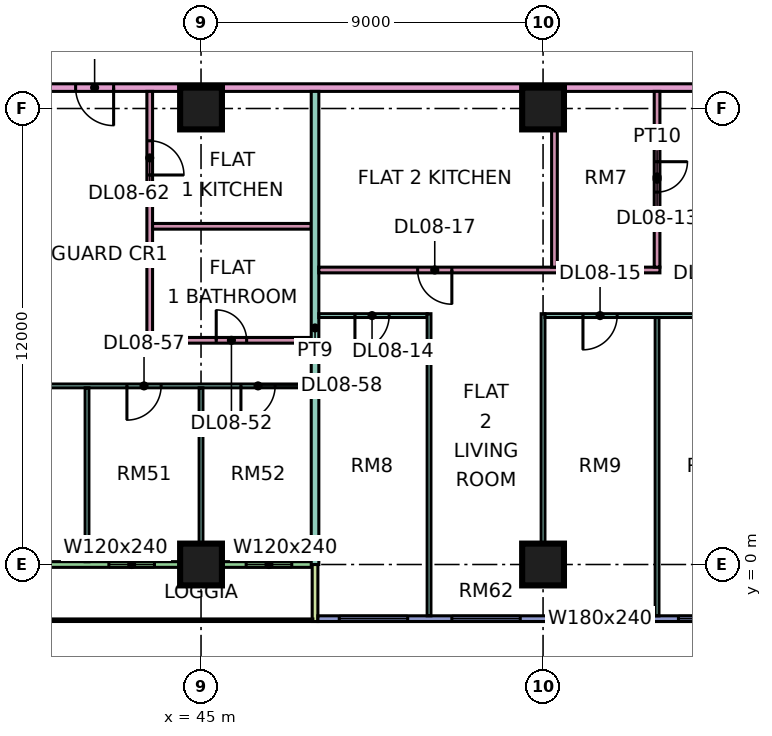
"""IFC4 building model, lengths in metres.
Left out: names, types, materials, properties, quantities, classifications, styles, units other than length and angle.
Written with IfcOpenShell. Run it as: python <this file> out.ifc"""

import sys

from ifc_helpers import new_model, si_unit, direction, frame, frame_2d, origin, origin_2d, place, context, subcontext, project, spatial, rectangle, extrude, element, fill, save


model = new_model("IFC4")
c1 = context("Model", 3, precision=1e-05, world=origin(), true_north=direction((0.0, 1.0)))
c2 = subcontext(c1, "Body", "Model", "MODEL_VIEW")
j1 = project(units=[si_unit("LENGTHUNIT", "METRE"), si_unit("PLANEANGLEUNIT", "RADIAN")], contexts=[c1])
p1 = place(None, origin())
s1 = spatial("IfcSite", under=j1, at=p1, CompositionType="ELEMENT")
p2 = place(p1, origin())
s2 = spatial("IfcBuilding", under=s1, at=p2, CompositionType="ELEMENT")
p3 = place(p2, frame((0.0, 0.0, 45.15)))
s3 = spatial("IfcBuildingStorey", under=s2, at=p3, CompositionType="ELEMENT", Elevation=45.15)
for number, where, z_axis, x_axis in (
    (1, (45.0, 0.0, 0.0), (0.0, 0.0, 1.0), (1.0, 0.0, 0.0)),
    (2, (45.0, 12.0, 0.0), (0.0, 0.0, 1.0), (1.0, 0.0, 0.0)),
    (3, (54.0, 0.0, 0.0), (0.0, 0.0, 1.0), (1.0, 0.0, 0.0)),
    (4, (54.0, 12.0, 0.0), (0.0, 0.0, 1.0), (1.0, 0.0, 0.0)),
):
    element("IfcColumn", number, at=place(p3, frame(where, z_axis=z_axis, x_axis=x_axis)), inside=s3, PredefinedType="COLUMN", context=c2, shape_type="SweptSolid", body=[
        extrude(rectangle(XDim=1.1, YDim=1.1, at=origin_2d()), origin(), (0.0, 0.0, 1.0), 3.75),
    ])
p4 = place(p3, frame((36.075, 0.0, 0.0), z_axis=(0.0, 0.0, 1.0), x_axis=(1.0, 0.0, 0.0)))
e5 = element("IfcWall", 5, at=p4, inside=s3, PredefinedType="SOLIDWALL", context=c2, shape_type="SweptSolid", body=[
    extrude(rectangle(XDim=11.85, YDim=0.15, at=frame_2d((5.925, 0.0))), origin(), (0.0, 0.0, 1.0), 3.35),
])
p5 = place(p4, frame((2.35, 0.0, 0.0)))
e6 = element("IfcOpeningElement", 6, at=p5, cuts=e5, PredefinedType="OPENING", context=c2, shape_type="SweptSolid", body=[
    extrude(rectangle(XDim=1.8, YDim=2.4, at=frame_2d((0.9, 1.2))), frame((0.0, 0.085, 0.0), z_axis=(0.0, -1.0, 0.0), x_axis=(1.0, 0.0, 0.0)), (0.0, 0.0, 1.0), 0.17),
])
p6 = place(p4, frame((6.5, 0.0, 0.45)))
e7 = element("IfcOpeningElement", 7, at=p6, cuts=e5, PredefinedType="OPENING", context=c2, shape_type="SweptSolid", body=[
    extrude(rectangle(XDim=1.2, YDim=2.4, at=frame_2d((0.6, 1.2))), frame((0.0, 0.085, 0.0), z_axis=(0.0, -1.0, 0.0), x_axis=(1.0, 0.0, 0.0)), (0.0, 0.0, 1.0), 0.17),
])
p7 = place(p4, frame((10.113, 0.0, 0.45)))
e8 = element("IfcOpeningElement", 8, at=p7, cuts=e5, PredefinedType="OPENING", context=c2, shape_type="SweptSolid", body=[
    extrude(rectangle(XDim=1.2, YDim=2.4, at=frame_2d((0.6, 1.2))), frame((0.0, 0.085, 0.0), z_axis=(0.0, -1.0, 0.0), x_axis=(1.0, 0.0, 0.0)), (0.0, 0.0, 1.0), 0.17),
])
p8 = place(p3, frame((48.0, -1.5, 0.0), z_axis=(0.0, 0.0, 1.0), x_axis=(0.0, 1.0, 0.0)))
e9 = element("IfcWall", 9, at=p8, inside=s3, PredefinedType="SOLIDWALL", context=c2, shape_type="SweptSolid", body=[
    extrude(rectangle(XDim=1.5, YDim=0.15, at=frame_2d((0.75, 0.0))), origin(), (0.0, 0.0, 1.0), 3.35),
])
p9 = place(p3, frame((48.075, -1.425, 0.0), z_axis=(0.0, 0.0, 1.0), x_axis=(1.0, 0.0, 0.0)))
e10 = element("IfcWall", 10, at=p9, inside=s3, PredefinedType="SOLIDWALL", context=c2, shape_type="SweptSolid", body=[
    extrude(rectangle(XDim=11.85, YDim=0.15, at=frame_2d((5.925, 0.0))), origin(), (0.0, 0.0, 1.0), 3.35),
])
p10 = place(p9, frame((0.562, 0.0, 0.45)))
e11 = element("IfcOpeningElement", 11, at=p10, cuts=e10, PredefinedType="OPENING", context=c2, shape_type="SweptSolid", body=[
    extrude(rectangle(XDim=1.8, YDim=2.4, at=frame_2d((0.9, 1.2))), frame((0.0, 0.085, 0.0), z_axis=(0.0, -1.0, 0.0), x_axis=(1.0, 0.0, 0.0)), (0.0, 0.0, 1.0), 0.17),
])
p11 = place(p9, frame((3.525, 0.0, 0.45)))
e12 = element("IfcOpeningElement", 12, at=p11, cuts=e10, PredefinedType="OPENING", context=c2, shape_type="SweptSolid", body=[
    extrude(rectangle(XDim=1.8, YDim=2.4, at=frame_2d((0.9, 1.2))), frame((0.0, 0.085, 0.0), z_axis=(0.0, -1.0, 0.0), x_axis=(1.0, 0.0, 0.0)), (0.0, 0.0, 1.0), 0.17),
])
p12 = place(p9, frame((6.525, 0.0, 0.45)))
e13 = element("IfcOpeningElement", 13, at=p12, cuts=e10, PredefinedType="OPENING", context=c2, shape_type="SweptSolid", body=[
    extrude(rectangle(XDim=1.8, YDim=2.4, at=frame_2d((0.9, 1.2))), frame((0.0, 0.085, 0.0), z_axis=(0.0, -1.0, 0.0), x_axis=(1.0, 0.0, 0.0)), (0.0, 0.0, 1.0), 0.17),
])
p13 = place(p9, frame((9.488, 0.0, 0.45)))
e14 = element("IfcOpeningElement", 14, at=p13, cuts=e10, PredefinedType="OPENING", context=c2, shape_type="SweptSolid", body=[
    extrude(rectangle(XDim=1.8, YDim=2.4, at=frame_2d((0.9, 1.2))), frame((0.0, 0.085, 0.0), z_axis=(0.0, -1.0, 0.0), x_axis=(1.0, 0.0, 0.0)), (0.0, 0.0, 1.0), 0.17),
])
p14 = place(p3, frame((33.05, 4.7, 0.0), z_axis=(0.0, 0.0, 1.0), x_axis=(1.0, 0.0, 0.0)))
e15 = element("IfcWall", 15, at=p14, inside=s3, PredefinedType="PARTITIONING", context=c2, shape_type="SweptSolid", body=[
    extrude(rectangle(XDim=14.85, YDim=0.1, at=frame_2d((7.425, 0.0))), origin(), (0.0, 0.0, 1.0), 3.35),
])
p15 = place(p14, frame((10.0, 0.0, 0.0)))
e16 = element("IfcOpeningElement", 16, at=p15, cuts=e15, PredefinedType="OPENING", context=c2, shape_type="SweptSolid", body=[
    extrude(rectangle(XDim=0.9, YDim=2.1, at=frame_2d((0.45, 1.05))), frame((0.0, 0.06, 0.0), z_axis=(0.0, -1.0, 0.0), x_axis=(1.0, 0.0, 0.0)), (0.0, 0.0, 1.0), 0.12),
])
p16 = place(p14, frame((13.0, 0.0, 0.0)))
e17 = element("IfcOpeningElement", 17, at=p16, cuts=e15, PredefinedType="OPENING", context=c2, shape_type="SweptSolid", body=[
    extrude(rectangle(XDim=0.9, YDim=2.1, at=frame_2d((0.45, 1.05))), frame((0.0, 0.06, 0.0), z_axis=(0.0, -1.0, 0.0), x_axis=(1.0, 0.0, 0.0)), (0.0, 0.0, 1.0), 0.12),
])
p17 = place(p14, frame((4.0, 0.0, 0.0)))
e18 = element("IfcOpeningElement", 18, at=p17, cuts=e15, PredefinedType="OPENING", context=c2, shape_type="SweptSolid", body=[
    extrude(rectangle(XDim=0.9, YDim=2.1, at=frame_2d((0.45, 1.05))), frame((0.0, 0.06, 0.0), z_axis=(0.0, -1.0, 0.0), x_axis=(1.0, 0.0, 0.0)), (0.0, 0.0, 1.0), 0.12),
])
p18 = place(p3, frame((40.65, 12.55, 0.0), z_axis=(0.0, 0.0, 1.0), x_axis=(1.0, 0.0, 0.0)))
e19 = element("IfcWall", 19, at=p18, inside=s3, PredefinedType="PARTITIONING", context=c2, shape_type="SweptSolid", body=[
    extrude(rectangle(XDim=31.276, YDim=0.2, at=frame_2d((15.638, 0.0))), origin(), (0.0, 0.0, 1.0), 3.35),
])
p19 = place(p18, frame((17.4, 0.0, 0.0)))
e20 = element("IfcOpeningElement", 20, at=p19, cuts=e19, PredefinedType="OPENING", context=c2, shape_type="SweptSolid", body=[
    extrude(rectangle(XDim=1.0, YDim=2.1, at=frame_2d((0.5, 1.05))), frame((0.0, 0.11, 0.0), z_axis=(0.0, -1.0, 0.0), x_axis=(1.0, 0.0, 0.0)), (0.0, 0.0, 1.0), 0.22),
])
p20 = place(p18, frame((26.25, 0.0, 0.0)))
e21 = element("IfcOpeningElement", 21, at=p20, cuts=e19, PredefinedType="OPENING", context=c2, shape_type="SweptSolid", body=[
    extrude(rectangle(XDim=1.0, YDim=2.1, at=frame_2d((0.5, 1.05))), frame((0.0, 0.11, 0.0), z_axis=(0.0, -1.0, 0.0), x_axis=(1.0, 0.0, 0.0)), (0.0, 0.0, 1.0), 0.22),
])
p21 = place(p18, frame((1.05, 0.0, 0.0)))
e22 = element("IfcOpeningElement", 22, at=p21, cuts=e19, PredefinedType="OPENING", context=c2, shape_type="SweptSolid", body=[
    extrude(rectangle(XDim=1.0, YDim=2.1, at=frame_2d((0.5, 1.05))), frame((0.0, 0.11, 0.0), z_axis=(0.0, -1.0, 0.0), x_axis=(1.0, 0.0, 0.0)), (0.0, 0.0, 1.0), 0.22),
])
p22 = place(p3, frame((42.0, 0.074, 0.0), z_axis=(0.0, 0.0, 1.0), x_axis=(0.0, 1.0, 0.0)))
e23 = element("IfcWall", 23, at=p22, inside=s3, PredefinedType="PARTITIONING", context=c2, shape_type="SweptSolid", body=[
    extrude(rectangle(XDim=4.576, YDim=0.1, at=frame_2d((2.288, 0.0))), origin(), (0.0, 0.0, 1.0), 3.35),
])
p23 = place(p3, frame((43.65, 5.825, 0.0), z_axis=(0.0, 0.0, 1.0), x_axis=(0.0, 1.0, 0.0)))
e24 = element("IfcWall", 24, at=p23, inside=s3, PredefinedType="PARTITIONING", context=c2, shape_type="SweptSolid", body=[
    extrude(rectangle(XDim=6.625, YDim=0.15, at=frame_2d((3.312, 0.0))), origin(), (0.0, 0.0, 1.0), 3.35),
])
p24 = place(p23, frame((4.425, 0.0, 0.0)))
e25 = element("IfcOpeningElement", 25, at=p24, cuts=e24, PredefinedType="OPENING", context=c2, shape_type="SweptSolid", body=[
    extrude(rectangle(XDim=0.9, YDim=2.1, at=frame_2d((0.45, 1.05))), frame((0.0, 0.085, 0.0), z_axis=(0.0, -1.0, 0.0), x_axis=(1.0, 0.0, 0.0)), (0.0, 0.0, 1.0), 0.17),
])
p25 = place(p3, frame((43.725, 5.9, 0.0), z_axis=(0.0, 0.0, 1.0), x_axis=(1.0, 0.0, 0.0)))
e26 = element("IfcWall", 26, at=p25, inside=s3, PredefinedType="PARTITIONING", context=c2, shape_type="SweptSolid", body=[
    extrude(rectangle(XDim=4.175, YDim=0.15, at=frame_2d((2.087, 0.0))), origin(), (0.0, 0.0, 1.0), 3.35),
])
p26 = place(p25, frame((1.675, 0.0, 0.0)))
e27 = element("IfcOpeningElement", 27, at=p26, cuts=e26, PredefinedType="OPENING", context=c2, shape_type="SweptSolid", body=[
    extrude(rectangle(XDim=0.8, YDim=2.1, at=frame_2d((0.4, 1.05))), frame((0.0, 0.085, 0.0), z_axis=(0.0, -1.0, 0.0), x_axis=(1.0, 0.0, 0.0)), (0.0, 0.0, 1.0), 0.17),
])
p27 = place(p3, frame((43.725, 8.9, 0.0), z_axis=(0.0, 0.0, 1.0), x_axis=(1.0, 0.0, 0.0)))
e28 = element("IfcWall", 28, at=p27, inside=s3, PredefinedType="PARTITIONING", context=c2, shape_type="SweptSolid", body=[
    extrude(rectangle(XDim=4.175, YDim=0.15, at=frame_2d((2.087, 0.0))), origin(), (0.0, 0.0, 1.0), 3.35),
])
p28 = place(p3, frame((45.0, 0.074, 0.0), z_axis=(0.0, 0.0, 1.0), x_axis=(0.0, 1.0, 0.0)))
e29 = element("IfcWall", 29, at=p28, inside=s3, PredefinedType="PARTITIONING", context=c2, shape_type="SweptSolid", body=[
    extrude(rectangle(XDim=4.576, YDim=0.1, at=frame_2d((2.288, 0.0))), origin(), (0.0, 0.0, 1.0), 3.35),
])
p29 = place(p3, frame((48.0, 0.0, 0.0), z_axis=(0.0, 0.0, 1.0), x_axis=(0.0, 1.0, 0.0)))
e30 = element("IfcWall", 30, at=p29, inside=s3, PredefinedType="PARTITIONING", context=c2, shape_type="SweptSolid", body=[
    extrude(rectangle(XDim=12.45, YDim=0.2, at=frame_2d((6.225, 0.0))), origin(), (0.0, 0.0, 1.0), 3.35),
])
p30 = place(p3, frame((48.1, 6.55, 0.0), z_axis=(0.0, 0.0, 1.0), x_axis=(1.0, 0.0, 0.0)))
e31 = element("IfcWall", 31, at=p30, inside=s3, PredefinedType="PARTITIONING", context=c2, shape_type="SweptSolid", body=[
    extrude(rectangle(XDim=2.85, YDim=0.1, at=frame_2d((1.425, 0.0))), origin(), (0.0, 0.0, 1.0), 3.35),
])
p31 = place(p30, frame((0.95, 0.0, 0.0)))
e32 = element("IfcOpeningElement", 32, at=p31, cuts=e31, PredefinedType="OPENING", context=c2, shape_type="SweptSolid", body=[
    extrude(rectangle(XDim=0.9, YDim=2.1, at=frame_2d((0.45, 1.05))), frame((0.0, 0.06, 0.0), z_axis=(0.0, -1.0, 0.0), x_axis=(1.0, 0.0, 0.0)), (0.0, 0.0, 1.0), 0.12),
])
p32 = place(p3, frame((48.1, 7.75, 0.0), z_axis=(0.0, 0.0, 1.0), x_axis=(1.0, 0.0, 0.0)))
e33 = element("IfcWall", 33, at=p32, inside=s3, PredefinedType="PARTITIONING", context=c2, shape_type="SweptSolid", body=[
    extrude(rectangle(XDim=8.975, YDim=0.15, at=frame_2d((4.487, 0.0))), origin(), (0.0, 0.0, 1.0), 3.35),
])
p33 = place(p32, frame((2.6, 0.0, 0.0)))
e34 = element("IfcOpeningElement", 34, at=p33, cuts=e33, PredefinedType="OPENING", context=c2, shape_type="SweptSolid", body=[
    extrude(rectangle(XDim=0.9, YDim=2.1, at=frame_2d((0.45, 1.05))), frame((0.0, 0.085, 0.0), z_axis=(0.0, -1.0, 0.0), x_axis=(1.0, 0.0, 0.0)), (0.0, 0.0, 1.0), 0.17),
])
p34 = place(p3, frame((51.0, -1.35, 0.0), z_axis=(0.0, 0.0, 1.0), x_axis=(0.0, 1.0, 0.0)))
e35 = element("IfcWall", 35, at=p34, inside=s3, PredefinedType="PARTITIONING", context=c2, shape_type="SweptSolid", body=[
    extrude(rectangle(XDim=7.95, YDim=0.1, at=frame_2d((3.975, 0.0))), origin(), (0.0, 0.0, 1.0), 3.35),
])
p35 = place(p3, frame((54.0, 0.0, 0.0), z_axis=(0.0, 0.0, 1.0), x_axis=(0.0, 1.0, 0.0)))
e36 = element("IfcWall", 36, at=p35, inside=s3, PredefinedType="PARTITIONING", context=c2, shape_type="SweptSolid", body=[
    extrude(rectangle(XDim=6.6, YDim=0.1, at=frame_2d((3.3, 0.0))), origin(), (0.0, 0.0, 1.0), 3.35),
])
p36 = place(p3, frame((54.05, 6.55, 0.0), z_axis=(0.0, 0.0, 1.0), x_axis=(1.0, 0.0, 0.0)))
e37 = element("IfcWall", 37, at=p36, inside=s3, PredefinedType="PARTITIONING", context=c2, shape_type="SweptSolid", body=[
    extrude(rectangle(XDim=5.85, YDim=0.1, at=frame_2d((2.925, 0.0))), origin(), (0.0, 0.0, 1.0), 3.35),
])
p37 = place(p36, frame((1.0, 0.0, 0.0)))
e38 = element("IfcOpeningElement", 38, at=p37, cuts=e37, PredefinedType="OPENING", context=c2, shape_type="SweptSolid", body=[
    extrude(rectangle(XDim=0.9, YDim=2.1, at=frame_2d((0.45, 1.05))), frame((0.0, 0.06, 0.0), z_axis=(0.0, -1.0, 0.0), x_axis=(1.0, 0.0, 0.0)), (0.0, 0.0, 1.0), 0.12),
])
p38 = place(p36, frame((4.0, 0.0, 0.0)))
e39 = element("IfcOpeningElement", 39, at=p38, cuts=e37, PredefinedType="OPENING", context=c2, shape_type="SweptSolid", body=[
    extrude(rectangle(XDim=0.9, YDim=2.1, at=frame_2d((0.45, 1.05))), frame((0.0, 0.06, 0.0), z_axis=(0.0, -1.0, 0.0), x_axis=(1.0, 0.0, 0.0)), (0.0, 0.0, 1.0), 0.12),
])
p39 = place(p3, frame((54.3, 7.825, 0.0), z_axis=(0.0, 0.0, 1.0), x_axis=(0.0, 1.0, 0.0)))
e40 = element("IfcWall", 40, at=p39, inside=s3, PredefinedType="PARTITIONING", context=c2, shape_type="SweptSolid", body=[
    extrude(rectangle(XDim=4.625, YDim=0.15, at=frame_2d((2.312, 0.0))), origin(), (0.0, 0.0, 1.0), 3.35),
])
p40 = place(p3, frame((57.0, -1.351, 0.0), z_axis=(0.0, 0.0, 1.0), x_axis=(0.0, 1.0, 0.0)))
e41 = element("IfcWall", 41, at=p40, inside=s3, PredefinedType="PARTITIONING", context=c2, shape_type="SweptSolid", body=[
    extrude(rectangle(XDim=7.851, YDim=0.1, at=frame_2d((3.926, 0.0))), origin(), (0.0, 0.0, 1.0), 3.35),
])
p41 = place(p3, frame((57.0, 7.825, 0.0), z_axis=(0.0, 0.0, 1.0), x_axis=(0.0, 1.0, 0.0)))
e42 = element("IfcWall", 42, at=p41, inside=s3, PredefinedType="PARTITIONING", context=c2, shape_type="SweptSolid", body=[
    extrude(rectangle(XDim=4.625, YDim=0.15, at=frame_2d((2.312, 0.0))), origin(), (0.0, 0.0, 1.0), 3.35),
])
p42 = place(p41, frame((1.975, 0.0, 0.0)))
e43 = element("IfcOpeningElement", 43, at=p42, cuts=e42, PredefinedType="OPENING", context=c2, shape_type="SweptSolid", body=[
    extrude(rectangle(XDim=0.8, YDim=2.1, at=frame_2d((0.4, 1.05))), frame((0.0, 0.085, 0.0), z_axis=(0.0, -1.0, 0.0), x_axis=(1.0, 0.0, 0.0)), (0.0, 0.0, 1.0), 0.17),
])
p43 = place(p6, origin())
e44 = element("IfcWindow", 44, at=p43, inside=s3, PartitioningType="SINGLE_PANEL", PredefinedType="WINDOW", context=c2, shape_type="SweptSolid", body=[
    extrude(rectangle(XDim=1.2, YDim=2.4, at=frame_2d((0.6, 1.2))), frame((0.0, 0.03, 0.0), z_axis=(0.0, -1.0, 0.0), x_axis=(1.0, 0.0, 0.0)), (0.0, 0.0, 1.0), 0.06),
])
fill(e7, e44)
p44 = place(p7, origin())
e45 = element("IfcWindow", 45, at=p44, inside=s3, PartitioningType="SINGLE_PANEL", PredefinedType="WINDOW", context=c2, shape_type="SweptSolid", body=[
    extrude(rectangle(XDim=1.2, YDim=2.4, at=frame_2d((0.6, 1.2))), frame((0.0, 0.03, 0.0), z_axis=(0.0, -1.0, 0.0), x_axis=(1.0, 0.0, 0.0)), (0.0, 0.0, 1.0), 0.06),
])
fill(e8, e45)
p45 = place(p10, origin())
e46 = element("IfcWindow", 46, at=p45, inside=s3, PartitioningType="SINGLE_PANEL", PredefinedType="WINDOW", context=c2, shape_type="SweptSolid", body=[
    extrude(rectangle(XDim=1.8, YDim=2.4, at=frame_2d((0.9, 1.2))), frame((0.0, 0.03, 0.0), z_axis=(0.0, -1.0, 0.0), x_axis=(1.0, 0.0, 0.0)), (0.0, 0.0, 1.0), 0.06),
])
fill(e11, e46)
p46 = place(p11, origin())
e47 = element("IfcWindow", 47, at=p46, inside=s3, PartitioningType="SINGLE_PANEL", PredefinedType="WINDOW", context=c2, shape_type="SweptSolid", body=[
    extrude(rectangle(XDim=1.8, YDim=2.4, at=frame_2d((0.9, 1.2))), frame((0.0, 0.03, 0.0), z_axis=(0.0, -1.0, 0.0), x_axis=(1.0, 0.0, 0.0)), (0.0, 0.0, 1.0), 0.06),
])
fill(e12, e47)
p47 = place(p12, origin())
e48 = element("IfcWindow", 48, at=p47, inside=s3, PartitioningType="SINGLE_PANEL", PredefinedType="WINDOW", context=c2, shape_type="SweptSolid", body=[
    extrude(rectangle(XDim=1.8, YDim=2.4, at=frame_2d((0.9, 1.2))), frame((0.0, 0.03, 0.0), z_axis=(0.0, -1.0, 0.0), x_axis=(1.0, 0.0, 0.0)), (0.0, 0.0, 1.0), 0.06),
])
fill(e13, e48)
p48 = place(p13, origin())
e49 = element("IfcWindow", 49, at=p48, inside=s3, PartitioningType="SINGLE_PANEL", PredefinedType="WINDOW", context=c2, shape_type="SweptSolid", body=[
    extrude(rectangle(XDim=1.8, YDim=2.4, at=frame_2d((0.9, 1.2))), frame((0.0, 0.03, 0.0), z_axis=(0.0, -1.0, 0.0), x_axis=(1.0, 0.0, 0.0)), (0.0, 0.0, 1.0), 0.06),
])
fill(e14, e49)
p49 = place(p42, origin())
e50 = element("IfcDoor", 50, at=p49, inside=s3, OperationType="SINGLE_SWING_RIGHT", PredefinedType="DOOR", context=c2, shape_type="SweptSolid", body=[
    extrude(rectangle(XDim=0.8, YDim=2.1, at=frame_2d((0.4, 1.05))), frame((0.0, 0.025, 0.0), z_axis=(0.0, -1.0, 0.0), x_axis=(1.0, 0.0, 0.0)), (0.0, 0.0, 1.0), 0.05),
])
fill(e43, e50)
p50 = place(p31, frame((0.9, 0.0, 0.0), z_axis=(0.0, 0.0, 1.0), x_axis=(-1.0, 0.0, 0.0)))
e51 = element("IfcDoor", 51, at=p50, inside=s3, OperationType="SINGLE_SWING_LEFT", PredefinedType="DOOR", context=c2, shape_type="SweptSolid", body=[
    extrude(rectangle(XDim=0.9, YDim=2.1, at=frame_2d((0.45, 1.05))), frame((0.0, 0.025, 0.0), z_axis=(0.0, -1.0, 0.0), x_axis=(1.0, 0.0, 0.0)), (0.0, 0.0, 1.0), 0.05),
])
fill(e32, e51)
p51 = place(p37, frame((0.9, 0.0, 0.0), z_axis=(0.0, 0.0, 1.0), x_axis=(-1.0, 0.0, 0.0)))
e52 = element("IfcDoor", 52, at=p51, inside=s3, OperationType="SINGLE_SWING_LEFT", PredefinedType="DOOR", context=c2, shape_type="SweptSolid", body=[
    extrude(rectangle(XDim=0.9, YDim=2.1, at=frame_2d((0.45, 1.05))), frame((0.0, 0.025, 0.0), z_axis=(0.0, -1.0, 0.0), x_axis=(1.0, 0.0, 0.0)), (0.0, 0.0, 1.0), 0.05),
])
fill(e38, e52)
p52 = place(p33, origin())
e53 = element("IfcDoor", 53, at=p52, inside=s3, OperationType="SINGLE_SWING_RIGHT", PredefinedType="DOOR", context=c2, shape_type="SweptSolid", body=[
    extrude(rectangle(XDim=0.9, YDim=2.1, at=frame_2d((0.45, 1.05))), frame((0.0, 0.025, 0.0), z_axis=(0.0, -1.0, 0.0), x_axis=(1.0, 0.0, 0.0)), (0.0, 0.0, 1.0), 0.05),
])
fill(e34, e53)
p53 = place(p26, origin())
e54 = element("IfcDoor", 54, at=p53, inside=s3, OperationType="SINGLE_SWING_LEFT", PredefinedType="DOOR", context=c2, shape_type="SweptSolid", body=[
    extrude(rectangle(XDim=0.8, YDim=2.1, at=frame_2d((0.4, 1.05))), frame((0.0, 0.025, 0.0), z_axis=(0.0, -1.0, 0.0), x_axis=(1.0, 0.0, 0.0)), (0.0, 0.0, 1.0), 0.05),
])
fill(e27, e54)
p54 = place(p15, frame((0.9, 0.0, 0.0), z_axis=(0.0, 0.0, 1.0), x_axis=(-1.0, 0.0, 0.0)))
e55 = element("IfcDoor", 55, at=p54, inside=s3, OperationType="SINGLE_SWING_LEFT", PredefinedType="DOOR", context=c2, shape_type="SweptSolid", body=[
    extrude(rectangle(XDim=0.9, YDim=2.1, at=frame_2d((0.45, 1.05))), frame((0.0, 0.025, 0.0), z_axis=(0.0, -1.0, 0.0), x_axis=(1.0, 0.0, 0.0)), (0.0, 0.0, 1.0), 0.05),
])
fill(e16, e55)
p55 = place(p16, frame((0.9, 0.0, 0.0), z_axis=(0.0, 0.0, 1.0), x_axis=(-1.0, 0.0, 0.0)))
e56 = element("IfcDoor", 56, at=p55, inside=s3, OperationType="SINGLE_SWING_LEFT", PredefinedType="DOOR", context=c2, shape_type="SweptSolid", body=[
    extrude(rectangle(XDim=0.9, YDim=2.1, at=frame_2d((0.45, 1.05))), frame((0.0, 0.025, 0.0), z_axis=(0.0, -1.0, 0.0), x_axis=(1.0, 0.0, 0.0)), (0.0, 0.0, 1.0), 0.05),
])
fill(e17, e56)
p56 = place(p21, origin())
e57 = element("IfcDoor", 57, at=p56, inside=s3, OperationType="SINGLE_SWING_RIGHT", PredefinedType="DOOR", context=c2, shape_type="SweptSolid", body=[
    extrude(rectangle(XDim=1.0, YDim=2.1, at=frame_2d((0.5, 1.05))), frame((0.0, 0.025, 0.0), z_axis=(0.0, -1.0, 0.0), x_axis=(1.0, 0.0, 0.0)), (0.0, 0.0, 1.0), 0.05),
])
fill(e22, e57)
p57 = place(p24, frame((0.9, 0.0, 0.0), z_axis=(0.0, 0.0, 1.0), x_axis=(-1.0, 0.0, 0.0)))
e58 = element("IfcDoor", 58, at=p57, inside=s3, OperationType="SINGLE_SWING_LEFT", PredefinedType="DOOR", context=c2, shape_type="SweptSolid", body=[
    extrude(rectangle(XDim=0.9, YDim=2.1, at=frame_2d((0.45, 1.05))), frame((0.0, 0.025, 0.0), z_axis=(0.0, -1.0, 0.0), x_axis=(1.0, 0.0, 0.0)), (0.0, 0.0, 1.0), 0.05),
])
fill(e25, e58)
save(model, sys.argv[1])
